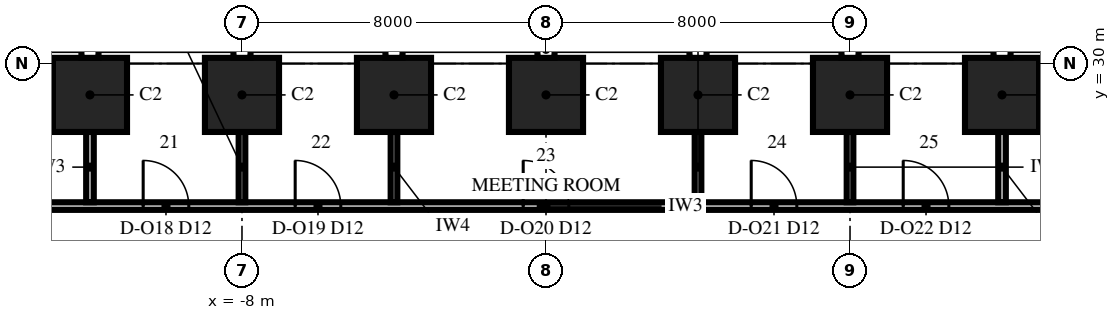
"""IFC4 building model, lengths in metres.
Left out: names, types, materials, properties, quantities, classifications, styles, units other than length and angle.
Written with IfcOpenShell. Run it as: python <this file> out.ifc"""

import sys

from ifc_helpers import new_model, si_unit, direction, frame, frame_2d, origin, origin_2d, place, context, subcontext, project, spatial, rectangle, extrude, element, fill, save


model = new_model("IFC4")
c1 = context("Model", 3, precision=1e-05, world=origin(), true_north=direction((0.0, 1.0)))
c2 = subcontext(c1, "Body", "Model", "MODEL_VIEW")
j1 = project(units=[si_unit("LENGTHUNIT", "METRE"), si_unit("PLANEANGLEUNIT", "RADIAN")], contexts=[c1])
p1 = place(None, origin())
s1 = spatial("IfcSite", under=j1, at=p1, CompositionType="ELEMENT")
p2 = place(p1, origin())
s2 = spatial("IfcBuilding", under=s1, at=p2, CompositionType="ELEMENT")
p3 = place(p2, frame((0.0, 0.0, 72.0)))
s3 = spatial("IfcBuildingStorey", under=s2, at=p3, CompositionType="ELEMENT", Elevation=72.0)
for number, where, z_axis, x_axis in (
    (1, (12.0, 29.175, 0.0), (0.0, 0.0, 1.0), (-1.0, 0.0, 0.0)),
    (2, (8.0, 29.175, 0.0), (0.0, 0.0, 1.0), (-1.0, 0.0, 0.0)),
    (3, (4.0, 29.175, 0.0), (0.0, 0.0, 1.0), (-1.0, 0.0, 0.0)),
    (4, (0.0, 29.175, 0.0), (0.0, 0.0, 1.0), (-1.0, 0.0, 0.0)),
    (5, (-4.0, 29.175, 0.0), (0.0, 0.0, 1.0), (-1.0, 0.0, 0.0)),
    (6, (-8.0, 29.175, 0.0), (0.0, 0.0, 1.0), (-1.0, 0.0, 0.0)),
    (7, (-12.0, 29.175, 0.0), (0.0, 0.0, 1.0), (-1.0, 0.0, 0.0)),
):
    element("IfcColumn", number, at=place(p3, frame(where, z_axis=z_axis, x_axis=x_axis)), inside=s3, PredefinedType="COLUMN", context=c2, shape_type="SweptSolid", body=[
        extrude(rectangle(XDim=1.95, YDim=1.95, at=origin_2d()), origin(), (0.0, 0.0, 1.0), 4.0),
    ])
p4 = place(p3, frame((-16.35, 26.25, 0.0), z_axis=(0.0, 0.0, 1.0), x_axis=(1.0, 0.0, 0.0)))
e8 = element("IfcWall", 8, at=p4, inside=s3, PredefinedType="PARTITIONING", context=c2, shape_type="SweptSolid", body=[
    extrude(rectangle(XDim=32.45, YDim=0.2, at=frame_2d((16.225, 0.0))), origin(), (0.0, 0.0, 1.0), 3.4),
])
p5 = place(p4, frame((5.75, 0.0, 0.0)))
e9 = element("IfcOpeningElement", 9, at=p5, cuts=e8, PredefinedType="OPENING", context=c2, shape_type="SweptSolid", body=[
    extrude(rectangle(XDim=1.2, YDim=2.4, at=frame_2d((0.6, 1.2))), frame((0.0, 0.115, 0.0), z_axis=(0.0, -1.0, 0.0), x_axis=(1.0, 0.0, 0.0)), (0.0, 0.0, 1.0), 0.23),
])
p6 = place(p4, frame((9.75, 0.0, 0.0)))
e10 = element("IfcOpeningElement", 10, at=p6, cuts=e8, PredefinedType="OPENING", context=c2, shape_type="SweptSolid", body=[
    extrude(rectangle(XDim=1.2, YDim=2.4, at=frame_2d((0.6, 1.2))), frame((0.0, 0.115, 0.0), z_axis=(0.0, -1.0, 0.0), x_axis=(1.0, 0.0, 0.0)), (0.0, 0.0, 1.0), 0.23),
])
p7 = place(p4, frame((15.75, 0.0, 0.0)))
e11 = element("IfcOpeningElement", 11, at=p7, cuts=e8, PredefinedType="OPENING", context=c2, shape_type="SweptSolid", body=[
    extrude(rectangle(XDim=1.2, YDim=2.4, at=frame_2d((0.6, 1.2))), frame((0.0, 0.115, 0.0), z_axis=(0.0, -1.0, 0.0), x_axis=(1.0, 0.0, 0.0)), (0.0, 0.0, 1.0), 0.23),
])
p8 = place(p4, frame((21.75, 0.0, 0.0)))
e12 = element("IfcOpeningElement", 12, at=p8, cuts=e8, PredefinedType="OPENING", context=c2, shape_type="SweptSolid", body=[
    extrude(rectangle(XDim=1.2, YDim=2.4, at=frame_2d((0.6, 1.2))), frame((0.0, 0.115, 0.0), z_axis=(0.0, -1.0, 0.0), x_axis=(1.0, 0.0, 0.0)), (0.0, 0.0, 1.0), 0.23),
])
p9 = place(p4, frame((25.75, 0.0, 0.0)))
e13 = element("IfcOpeningElement", 13, at=p9, cuts=e8, PredefinedType="OPENING", context=c2, shape_type="SweptSolid", body=[
    extrude(rectangle(XDim=1.2, YDim=2.4, at=frame_2d((0.6, 1.2))), frame((0.0, 0.115, 0.0), z_axis=(0.0, -1.0, 0.0), x_axis=(1.0, 0.0, 0.0)), (0.0, 0.0, 1.0), 0.23),
])
p10 = place(p3, frame((-12.0, 26.35, 0.0), z_axis=(0.0, 0.0, 1.0), x_axis=(0.0, 1.0, 0.0)))
e14 = element("IfcWall", 14, at=p10, inside=s3, PredefinedType="PARTITIONING", context=c2, shape_type="SweptSolid", body=[
    extrude(rectangle(XDim=1.85, YDim=0.2, at=frame_2d((0.925, 0.0))), origin(), (0.0, 0.0, 1.0), 3.4),
])
p11 = place(p3, frame((-8.0, 26.35, 0.0), z_axis=(0.0, 0.0, 1.0), x_axis=(0.0, 1.0, 0.0)))
e15 = element("IfcWall", 15, at=p11, inside=s3, PredefinedType="PARTITIONING", context=c2, shape_type="SweptSolid", body=[
    extrude(rectangle(XDim=1.85, YDim=0.175, at=frame_2d((0.925, 0.0))), origin(), (0.0, 0.0, 1.0), 3.4),
])
for number, where, z_axis, x_axis in (
    (16, (-4.0, 26.35, 0.0), (0.0, 0.0, 1.0), (0.0, 1.0, 0.0)),
    (17, (4.0, 26.35, 0.0), (0.0, 0.0, 1.0), (0.0, 1.0, 0.0)),
):
    element("IfcWall", number, at=place(p3, frame(where, z_axis=z_axis, x_axis=x_axis)), inside=s3, PredefinedType="PARTITIONING", context=c2, shape_type="SweptSolid", body=[
        extrude(rectangle(XDim=1.85, YDim=0.175, at=frame_2d((0.925, 0.0))), origin(), (0.0, 0.0, 1.0), 3.85),
    ])
p12 = place(p3, frame((8.0, 26.35, 0.0), z_axis=(0.0, 0.0, 1.0), x_axis=(0.0, 1.0, 0.0)))
e18 = element("IfcWall", 18, at=p12, inside=s3, PredefinedType="PARTITIONING", context=c2, shape_type="SweptSolid", body=[
    extrude(rectangle(XDim=1.85, YDim=0.175, at=frame_2d((0.925, 0.0))), origin(), (0.0, 0.0, 1.0), 3.4),
])
p13 = place(p3, frame((12.0, 26.35, 0.0), z_axis=(0.0, 0.0, 1.0), x_axis=(0.0, 1.0, 0.0)))
e19 = element("IfcWall", 19, at=p13, inside=s3, PredefinedType="PARTITIONING", context=c2, shape_type="SweptSolid", body=[
    extrude(rectangle(XDim=1.85, YDim=0.2, at=frame_2d((0.925, 0.0))), origin(), (0.0, 0.0, 1.0), 3.4),
])
p14 = place(p5, origin())
e20 = element("IfcDoor", 20, at=p14, inside=s3, OperationType="SINGLE_SWING_LEFT", PredefinedType="DOOR", context=c2, shape_type="SweptSolid", body=[
    extrude(rectangle(XDim=1.2, YDim=2.4, at=frame_2d((0.6, 1.2))), frame((0.0, 0.1, 0.0), z_axis=(0.0, -1.0, 0.0), x_axis=(1.0, 0.0, 0.0)), (0.0, 0.0, 1.0), 0.199),
])
fill(e9, e20)
p15 = place(p6, origin())
e21 = element("IfcDoor", 21, at=p15, inside=s3, OperationType="SINGLE_SWING_LEFT", PredefinedType="DOOR", context=c2, shape_type="SweptSolid", body=[
    extrude(rectangle(XDim=1.2, YDim=2.4, at=frame_2d((0.6, 1.2))), frame((0.0, 0.1, 0.0), z_axis=(0.0, -1.0, 0.0), x_axis=(1.0, 0.0, 0.0)), (0.0, 0.0, 1.0), 0.199),
])
fill(e10, e21)
p16 = place(p7, origin())
e22 = element("IfcDoor", 22, at=p16, inside=s3, OperationType="SINGLE_SWING_LEFT", PredefinedType="DOOR", context=c2, shape_type="SweptSolid", body=[
    extrude(rectangle(XDim=1.2, YDim=2.4, at=frame_2d((0.6, 1.2))), frame((0.0, 0.1, 0.0), z_axis=(0.0, -1.0, 0.0), x_axis=(1.0, 0.0, 0.0)), (0.0, 0.0, 1.0), 0.199),
])
fill(e11, e22)
p17 = place(p8, origin())
e23 = element("IfcDoor", 23, at=p17, inside=s3, OperationType="SINGLE_SWING_LEFT", PredefinedType="DOOR", context=c2, shape_type="SweptSolid", body=[
    extrude(rectangle(XDim=1.2, YDim=2.4, at=frame_2d((0.6, 1.2))), frame((0.0, 0.1, 0.0), z_axis=(0.0, -1.0, 0.0), x_axis=(1.0, 0.0, 0.0)), (0.0, 0.0, 1.0), 0.199),
])
fill(e12, e23)
p18 = place(p9, origin())
e24 = element("IfcDoor", 24, at=p18, inside=s3, OperationType="SINGLE_SWING_LEFT", PredefinedType="DOOR", context=c2, shape_type="SweptSolid", body=[
    extrude(rectangle(XDim=1.2, YDim=2.4, at=frame_2d((0.6, 1.2))), frame((0.0, 0.1, 0.0), z_axis=(0.0, -1.0, 0.0), x_axis=(1.0, 0.0, 0.0)), (0.0, 0.0, 1.0), 0.199),
])
fill(e13, e24)
save(model, sys.argv[1])
